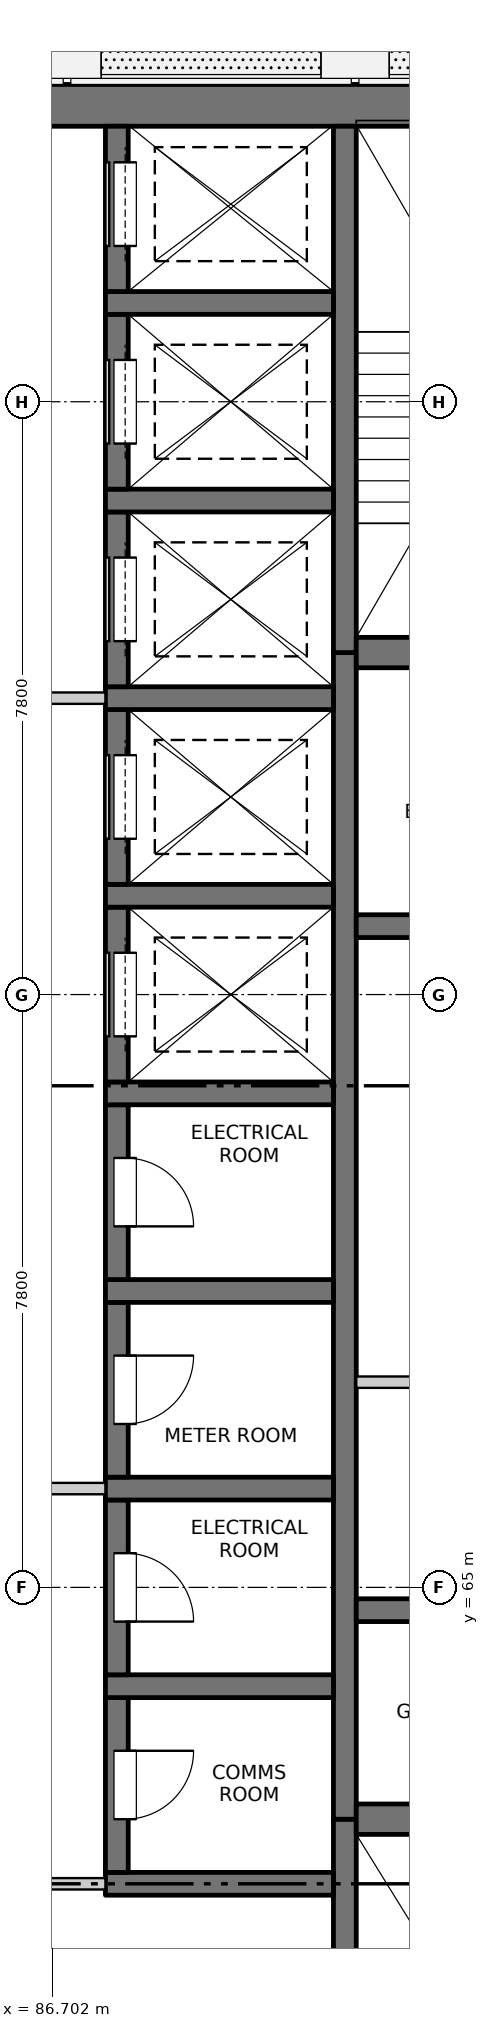
"""IFC4 building model, lengths in metres.
Left out: names, types, materials, properties, quantities, classifications, styles, units other than length and angle.
Written with IfcOpenShell. Run it as: python <this file> out.ifc"""

import sys

from ifc_helpers import new_model, si_unit, direction, frame, frame_2d, origin, place, context, subcontext, project, spatial, rectangle, extrude, element, fill, save


model = new_model("IFC4")
c1 = context("Model", 3, precision=1e-05, world=origin(), true_north=direction((0.0, 1.0)))
c2 = subcontext(c1, "Body", "Model", "MODEL_VIEW")
j1 = project(units=[si_unit("LENGTHUNIT", "METRE"), si_unit("PLANEANGLEUNIT", "RADIAN")], contexts=[c1])
p1 = place(None, origin())
s1 = spatial("IfcSite", under=j1, at=p1, CompositionType="ELEMENT")
p2 = place(p1, origin())
s2 = spatial("IfcBuilding", under=s1, at=p2, CompositionType="ELEMENT")
p3 = place(p2, frame((0.0, 0.0, 148.6)))
s3 = spatial("IfcBuildingStorey", under=s2, at=p3, CompositionType="ELEMENT", Elevation=148.6)
p4 = place(p3, frame((75.525, 84.5, -0.3), z_axis=(0.0, 0.0, 1.0), x_axis=(1.0, 0.0, 0.0)))
e1 = element("IfcWall", 1, at=p4, inside=s3, PredefinedType="SOLIDWALL", context=c2, shape_type="SweptSolid", body=[
    extrude(rectangle(XDim=18.95, YDim=0.55, at=frame_2d((9.475, 0.0))), origin(), (0.0, 0.0, 1.0), 3.45),
])
p5 = place(p3, frame((90.55, 55.525, -0.3), z_axis=(0.0, 0.0, 1.0), x_axis=(0.0, 1.0, 0.0)))
e2 = element("IfcWall", 2, at=p5, inside=s3, PredefinedType="SOLIDWALL", context=c2, shape_type="SweptSolid", body=[
    extrude(rectangle(XDim=6.425, YDim=0.3, at=frame_2d((3.212, 0.0))), origin(), (0.0, 0.0, 1.0), 3.45),
])
p6 = place(p5, frame((0.125, 0.0, 0.3)))
e3 = element("IfcOpeningElement", 3, at=p6, cuts=e2, PredefinedType="OPENING", context=c2, shape_type="SweptSolid", body=[
    extrude(rectangle(XDim=1.2, YDim=2.1, at=frame_2d((0.6, 1.05))), frame((0.0, 0.16, 0.0), z_axis=(0.0, -1.0, 0.0), x_axis=(1.0, 0.0, 0.0)), (0.0, 0.0, 1.0), 0.32),
])
p7 = place(p3, frame((90.55, 61.95, -0.3), z_axis=(0.0, 0.0, 1.0), x_axis=(0.0, 1.0, 0.0)))
e4 = element("IfcWall", 4, at=p7, inside=s3, PredefinedType="SOLIDWALL", context=c2, shape_type="SweptSolid", body=[
    extrude(rectangle(XDim=15.35, YDim=0.3, at=frame_2d((7.675, 0.0))), origin(), (0.0, 0.0, 1.0), 3.45),
])
p8 = place(p3, frame((90.55, 77.3, -0.3), z_axis=(0.0, 0.0, 1.0), x_axis=(0.0, 1.0, 0.0)))
e5 = element("IfcWall", 5, at=p8, inside=s3, PredefinedType="SOLIDWALL", context=c2, shape_type="SweptSolid", body=[
    extrude(rectangle(XDim=6.925, YDim=0.3, at=frame_2d((3.462, 0.0))), origin(), (0.0, 0.0, 1.0), 3.45),
])
p9 = place(p3, frame((87.4, 61.1, -0.3), z_axis=(0.0, 0.0, 1.0), x_axis=(1.0, 0.0, 0.0)))
e6 = element("IfcWall", 6, at=p9, inside=s3, PredefinedType="SOLIDWALL", context=c2, shape_type="SweptSolid", body=[
    extrude(rectangle(XDim=3.0, YDim=0.3, at=frame_2d((1.5, 0.0))), origin(), (0.0, 0.0, 1.0), 3.45),
])
p10 = place(p3, frame((87.55, 61.25, -0.3), z_axis=(0.0, 0.0, 1.0), x_axis=(0.0, 1.0, 0.0)))
e7 = element("IfcWall", 7, at=p10, inside=s3, PredefinedType="SOLIDWALL", context=c2, shape_type="SweptSolid", body=[
    extrude(rectangle(XDim=2.3, YDim=0.3, at=frame_2d((1.15, 0.0))), origin(), (0.0, 0.0, 1.0), 3.45),
])
p11 = place(p10, frame((0.7, 0.0, 0.3)))
e8 = element("IfcOpeningElement", 8, at=p11, cuts=e7, PredefinedType="OPENING", context=c2, shape_type="SweptSolid", body=[
    extrude(rectangle(XDim=0.9, YDim=2.1, at=frame_2d((0.45, 1.05))), frame((0.0, 0.16, 0.0), z_axis=(0.0, -1.0, 0.0), x_axis=(1.0, 0.0, 0.0)), (0.0, 0.0, 1.0), 0.32),
])
p12 = place(p3, frame((87.4, 63.7, -0.3), z_axis=(0.0, 0.0, 1.0), x_axis=(1.0, 0.0, 0.0)))
e9 = element("IfcWall", 9, at=p12, inside=s3, PredefinedType="SOLIDWALL", context=c2, shape_type="SweptSolid", body=[
    extrude(rectangle(XDim=3.0, YDim=0.3, at=frame_2d((1.5, 0.0))), origin(), (0.0, 0.0, 1.0), 3.45),
])
p13 = place(p3, frame((87.55, 63.85, -0.3), z_axis=(0.0, 0.0, 1.0), x_axis=(0.0, 1.0, 0.0)))
e10 = element("IfcWall", 10, at=p13, inside=s3, PredefinedType="SOLIDWALL", context=c2, shape_type="SweptSolid", body=[
    extrude(rectangle(XDim=2.3, YDim=0.3, at=frame_2d((1.15, 0.0))), origin(), (0.0, 0.0, 1.0), 3.45),
])
p14 = place(p13, frame((0.7, 0.0, 0.3)))
e11 = element("IfcOpeningElement", 11, at=p14, cuts=e10, PredefinedType="OPENING", context=c2, shape_type="SweptSolid", body=[
    extrude(rectangle(XDim=0.9, YDim=2.1, at=frame_2d((0.45, 1.05))), frame((0.0, 0.16, 0.0), z_axis=(0.0, -1.0, 0.0), x_axis=(1.0, 0.0, 0.0)), (0.0, 0.0, 1.0), 0.32),
])
p15 = place(p3, frame((87.4, 66.3, -0.3), z_axis=(0.0, 0.0, 1.0), x_axis=(1.0, 0.0, 0.0)))
e12 = element("IfcWall", 12, at=p15, inside=s3, PredefinedType="SOLIDWALL", context=c2, shape_type="SweptSolid", body=[
    extrude(rectangle(XDim=3.0, YDim=0.3, at=frame_2d((1.5, 0.0))), origin(), (0.0, 0.0, 1.0), 3.45),
])
p16 = place(p3, frame((87.55, 66.45, -0.3), z_axis=(0.0, 0.0, 1.0), x_axis=(0.0, 1.0, 0.0)))
e13 = element("IfcWall", 13, at=p16, inside=s3, PredefinedType="SOLIDWALL", context=c2, shape_type="SweptSolid", body=[
    extrude(rectangle(XDim=2.3, YDim=0.3, at=frame_2d((1.15, 0.0))), origin(), (0.0, 0.0, 1.0), 3.45),
])
p17 = place(p16, frame((0.7, 0.0, 0.3)))
e14 = element("IfcOpeningElement", 14, at=p17, cuts=e13, PredefinedType="OPENING", context=c2, shape_type="SweptSolid", body=[
    extrude(rectangle(XDim=0.9, YDim=2.1, at=frame_2d((0.45, 1.05))), frame((0.0, 0.16, 0.0), z_axis=(0.0, -1.0, 0.0), x_axis=(1.0, 0.0, 0.0)), (0.0, 0.0, 1.0), 0.32),
])
p18 = place(p3, frame((87.4, 68.9, -0.3), z_axis=(0.0, 0.0, 1.0), x_axis=(1.0, 0.0, 0.0)))
e15 = element("IfcWall", 15, at=p18, inside=s3, PredefinedType="SOLIDWALL", context=c2, shape_type="SweptSolid", body=[
    extrude(rectangle(XDim=3.0, YDim=0.3, at=frame_2d((1.5, 0.0))), origin(), (0.0, 0.0, 1.0), 3.45),
])
p19 = place(p3, frame((87.55, 69.05, -0.3), z_axis=(0.0, 0.0, 1.0), x_axis=(0.0, 1.0, 0.0)))
e16 = element("IfcWall", 16, at=p19, inside=s3, PredefinedType="SOLIDWALL", context=c2, shape_type="SweptSolid", body=[
    extrude(rectangle(XDim=2.3, YDim=0.3, at=frame_2d((1.15, 0.0))), origin(), (0.0, 0.0, 1.0), 3.45),
])
p20 = place(p19, frame((0.7, 0.0, 0.3)))
e17 = element("IfcOpeningElement", 17, at=p20, cuts=e16, PredefinedType="OPENING", context=c2, shape_type="SweptSolid", body=[
    extrude(rectangle(XDim=0.9, YDim=2.1, at=frame_2d((0.45, 1.05))), frame((0.0, 0.16, 0.0), z_axis=(0.0, -1.0, 0.0), x_axis=(1.0, 0.0, 0.0)), (0.0, 0.0, 1.0), 0.32),
])
p21 = place(p3, frame((87.4, 71.5, -0.3), z_axis=(0.0, 0.0, 1.0), x_axis=(1.0, 0.0, 0.0)))
e18 = element("IfcWall", 18, at=p21, inside=s3, PredefinedType="SOLIDWALL", context=c2, shape_type="SweptSolid", body=[
    extrude(rectangle(XDim=3.0, YDim=0.3, at=frame_2d((1.5, 0.0))), origin(), (0.0, 0.0, 1.0), 3.45),
])
p22 = place(p3, frame((87.55, 71.65, -0.3), z_axis=(0.0, 0.0, 1.0), x_axis=(0.0, 1.0, 0.0)))
e19 = element("IfcWall", 19, at=p22, inside=s3, PredefinedType="SOLIDWALL", context=c2, shape_type="SweptSolid", body=[
    extrude(rectangle(XDim=2.3, YDim=0.3, at=frame_2d((1.15, 0.0))), origin(), (0.0, 0.0, 1.0), 3.45),
])
p23 = place(p22, frame((0.6, 0.0, 0.3)))
e20 = element("IfcOpeningElement", 20, at=p23, cuts=e19, PredefinedType="OPENING", context=c2, shape_type="SweptSolid", body=[
    extrude(rectangle(XDim=1.1, YDim=2.1, at=frame_2d((0.55, 1.05))), frame((0.0, 0.16, 0.0), z_axis=(0.0, -1.0, 0.0), x_axis=(1.0, 0.0, 0.0)), (0.0, 0.0, 1.0), 0.32),
])
p24 = place(p3, frame((87.4, 74.1, -0.3), z_axis=(0.0, 0.0, 1.0), x_axis=(1.0, 0.0, 0.0)))
e21 = element("IfcWall", 21, at=p24, inside=s3, PredefinedType="SOLIDWALL", context=c2, shape_type="SweptSolid", body=[
    extrude(rectangle(XDim=3.0, YDim=0.3, at=frame_2d((1.5, 0.0))), origin(), (0.0, 0.0, 1.0), 3.45),
])
p25 = place(p3, frame((87.55, 74.25, -0.3), z_axis=(0.0, 0.0, 1.0), x_axis=(0.0, 1.0, 0.0)))
e22 = element("IfcWall", 22, at=p25, inside=s3, PredefinedType="SOLIDWALL", context=c2, shape_type="SweptSolid", body=[
    extrude(rectangle(XDim=2.3, YDim=0.3, at=frame_2d((1.15, 0.0))), origin(), (0.0, 0.0, 1.0), 3.45),
])
p26 = place(p25, frame((0.6, 0.0, 0.3)))
e23 = element("IfcOpeningElement", 23, at=p26, cuts=e22, PredefinedType="OPENING", context=c2, shape_type="SweptSolid", body=[
    extrude(rectangle(XDim=1.1, YDim=2.1, at=frame_2d((0.55, 1.05))), frame((0.0, 0.16, 0.0), z_axis=(0.0, -1.0, 0.0), x_axis=(1.0, 0.0, 0.0)), (0.0, 0.0, 1.0), 0.32),
])
p27 = place(p3, frame((87.4, 76.7, -0.3), z_axis=(0.0, 0.0, 1.0), x_axis=(1.0, 0.0, 0.0)))
e24 = element("IfcWall", 24, at=p27, inside=s3, PredefinedType="SOLIDWALL", context=c2, shape_type="SweptSolid", body=[
    extrude(rectangle(XDim=3.0, YDim=0.3, at=frame_2d((1.5, 0.0))), origin(), (0.0, 0.0, 1.0), 3.45),
])
p28 = place(p3, frame((87.55, 76.85, -0.3), z_axis=(0.0, 0.0, 1.0), x_axis=(0.0, 1.0, 0.0)))
e25 = element("IfcWall", 25, at=p28, inside=s3, PredefinedType="SOLIDWALL", context=c2, shape_type="SweptSolid", body=[
    extrude(rectangle(XDim=2.3, YDim=0.3, at=frame_2d((1.15, 0.0))), origin(), (0.0, 0.0, 1.0), 3.45),
])
p29 = place(p28, frame((0.6, 0.0, 0.3)))
e26 = element("IfcOpeningElement", 26, at=p29, cuts=e25, PredefinedType="OPENING", context=c2, shape_type="SweptSolid", body=[
    extrude(rectangle(XDim=1.1, YDim=2.1, at=frame_2d((0.55, 1.05))), frame((0.0, 0.16, 0.0), z_axis=(0.0, -1.0, 0.0), x_axis=(1.0, 0.0, 0.0)), (0.0, 0.0, 1.0), 0.32),
])
p30 = place(p3, frame((87.4, 79.3, -0.3), z_axis=(0.0, 0.0, 1.0), x_axis=(1.0, 0.0, 0.0)))
e27 = element("IfcWall", 27, at=p30, inside=s3, PredefinedType="SOLIDWALL", context=c2, shape_type="SweptSolid", body=[
    extrude(rectangle(XDim=3.0, YDim=0.3, at=frame_2d((1.5, 0.0))), origin(), (0.0, 0.0, 1.0), 3.45),
])
p31 = place(p3, frame((87.55, 79.45, -0.3), z_axis=(0.0, 0.0, 1.0), x_axis=(0.0, 1.0, 0.0)))
e28 = element("IfcWall", 28, at=p31, inside=s3, PredefinedType="SOLIDWALL", context=c2, shape_type="SweptSolid", body=[
    extrude(rectangle(XDim=2.3, YDim=0.3, at=frame_2d((1.15, 0.0))), origin(), (0.0, 0.0, 1.0), 3.45),
])
p32 = place(p31, frame((0.6, 0.0, 0.3)))
e29 = element("IfcOpeningElement", 29, at=p32, cuts=e28, PredefinedType="OPENING", context=c2, shape_type="SweptSolid", body=[
    extrude(rectangle(XDim=1.1, YDim=2.1, at=frame_2d((0.55, 1.05))), frame((0.0, 0.16, 0.0), z_axis=(0.0, -1.0, 0.0), x_axis=(1.0, 0.0, 0.0)), (0.0, 0.0, 1.0), 0.32),
])
p33 = place(p3, frame((87.4, 81.9, -0.3), z_axis=(0.0, 0.0, 1.0), x_axis=(1.0, 0.0, 0.0)))
e30 = element("IfcWall", 30, at=p33, inside=s3, PredefinedType="SOLIDWALL", context=c2, shape_type="SweptSolid", body=[
    extrude(rectangle(XDim=3.0, YDim=0.3, at=frame_2d((1.5, 0.0))), origin(), (0.0, 0.0, 1.0), 3.45),
])
p34 = place(p3, frame((87.55, 82.05, -0.3), z_axis=(0.0, 0.0, 1.0), x_axis=(0.0, 1.0, 0.0)))
e31 = element("IfcWall", 31, at=p34, inside=s3, PredefinedType="SOLIDWALL", context=c2, shape_type="SweptSolid", body=[
    extrude(rectangle(XDim=2.175, YDim=0.3, at=frame_2d((1.087, 0.0))), origin(), (0.0, 0.0, 1.0), 3.45),
])
p35 = place(p34, frame((0.6, 0.0, 0.3)))
e32 = element("IfcOpeningElement", 32, at=p35, cuts=e31, PredefinedType="OPENING", context=c2, shape_type="SweptSolid", body=[
    extrude(rectangle(XDim=1.1, YDim=2.1, at=frame_2d((0.55, 1.05))), frame((0.0, 0.16, 0.0), z_axis=(0.0, -1.0, 0.0), x_axis=(1.0, 0.0, 0.0)), (0.0, 0.0, 1.0), 0.32),
])
p36 = place(p3, frame((90.7, 61.95, -0.3), z_axis=(0.0, 0.0, 1.0), x_axis=(1.0, 0.0, 0.0)))
e33 = element("IfcWall", 33, at=p36, inside=s3, PredefinedType="SOLIDWALL", context=c2, shape_type="SweptSolid", body=[
    extrude(rectangle(XDim=3.775, YDim=0.4, at=frame_2d((1.888, 0.0))), origin(), (0.0, 0.0, 1.0), 3.45),
])
for number, where, z_axis, x_axis in (
    (34, (90.7, 64.7, -0.3), (0.0, 0.0, 1.0), (1.0, 0.0, 0.0)),
    (35, (90.7, 73.7, -0.3), (0.0, 0.0, 1.0), (1.0, 0.0, 0.0)),
):
    element("IfcWall", number, at=place(p3, frame(where, z_axis=z_axis, x_axis=x_axis)), inside=s3, PredefinedType="SOLIDWALL", context=c2, shape_type="SweptSolid", body=[
        extrude(rectangle(XDim=3.775, YDim=0.3, at=frame_2d((1.888, 0.0))), origin(), (0.0, 0.0, 1.0), 3.45),
    ])
p37 = place(p3, frame((90.7, 77.3, -0.3), z_axis=(0.0, 0.0, 1.0), x_axis=(1.0, 0.0, 0.0)))
e36 = element("IfcWall", 36, at=p37, inside=s3, PredefinedType="SOLIDWALL", context=c2, shape_type="SweptSolid", body=[
    extrude(rectangle(XDim=3.775, YDim=0.4, at=frame_2d((1.888, 0.0))), origin(), (0.0, 0.0, 1.0), 3.45),
])
p38 = place(p3, frame((82.6, 61.1, 0.0), z_axis=(0.0, 0.0, 1.0), x_axis=(1.0, 0.0, 0.0)))
e37 = element("IfcWall", 37, at=p38, inside=s3, PredefinedType="PARTITIONING", context=c2, shape_type="SweptSolid", body=[
    extrude(rectangle(XDim=4.8, YDim=0.15, at=frame_2d((2.4, 0.0))), origin(), (0.0, 0.0, 1.0), 3.15),
])
p39 = place(p38, frame((1.5, 0.0, 0.0)))
e38 = element("IfcOpeningElement", 38, at=p39, cuts=e37, PredefinedType="OPENING", context=c2, shape_type="SweptSolid", body=[
    extrude(rectangle(XDim=1.8, YDim=2.1, at=frame_2d((0.9, 1.05))), frame((0.0, 0.085, 0.0), z_axis=(0.0, -1.0, 0.0), x_axis=(1.0, 0.0, 0.0)), (0.0, 0.0, 1.0), 0.17),
])
p40 = place(p3, frame((82.6, 66.3, 0.0), z_axis=(0.0, 0.0, 1.0), x_axis=(1.0, 0.0, 0.0)))
e39 = element("IfcWall", 39, at=p40, inside=s3, PredefinedType="PARTITIONING", context=c2, shape_type="SweptSolid", body=[
    extrude(rectangle(XDim=4.8, YDim=0.15, at=frame_2d((2.4, 0.0))), origin(), (0.0, 0.0, 1.0), 3.15),
])
p41 = place(p40, frame((1.5, 0.0, 0.0)))
e40 = element("IfcOpeningElement", 40, at=p41, cuts=e39, PredefinedType="OPENING", context=c2, shape_type="SweptSolid", body=[
    extrude(rectangle(XDim=1.8, YDim=2.1, at=frame_2d((0.9, 1.05))), frame((0.0, 0.085, 0.0), z_axis=(0.0, -1.0, 0.0), x_axis=(1.0, 0.0, 0.0)), (0.0, 0.0, 1.0), 0.17),
])
p42 = place(p3, frame((90.7, 67.7, 0.0), z_axis=(0.0, 0.0, 1.0), x_axis=(1.0, 0.0, 0.0)))
e41 = element("IfcWall", 41, at=p42, inside=s3, PredefinedType="PARTITIONING", context=c2, shape_type="SweptSolid", body=[
    extrude(rectangle(XDim=3.775, YDim=0.15, at=frame_2d((1.887, 0.0))), origin(), (0.0, 0.0, 1.0), 3.15),
])
p43 = place(p3, frame((82.6, 76.7, 0.0), z_axis=(0.0, 0.0, 1.0), x_axis=(1.0, 0.0, 0.0)))
e42 = element("IfcWall", 42, at=p43, inside=s3, PredefinedType="PARTITIONING", context=c2, shape_type="SweptSolid", body=[
    extrude(rectangle(XDim=4.8, YDim=0.15, at=frame_2d((2.4, 0.0))), origin(), (0.0, 0.0, 1.0), 3.15),
])
p44 = place(p43, frame((1.5, 0.0, 0.0)))
e43 = element("IfcOpeningElement", 43, at=p44, cuts=e42, PredefinedType="OPENING", context=c2, shape_type="SweptSolid", body=[
    extrude(rectangle(XDim=1.8, YDim=2.1, at=frame_2d((0.9, 1.05))), frame((0.0, 0.085, 0.0), z_axis=(0.0, -1.0, 0.0), x_axis=(1.0, 0.0, 0.0)), (0.0, 0.0, 1.0), 0.17),
])
p45 = place(p11, origin())
e44 = element("IfcDoor", 44, at=p45, inside=s3, OperationType="SINGLE_SWING_LEFT", PredefinedType="DOOR", context=c2, shape_type="SweptSolid", body=[
    extrude(rectangle(XDim=0.9, YDim=2.1, at=frame_2d((0.45, 1.05))), frame((0.0, -0.085, 0.0), z_axis=(0.0, -1.0, 0.0), x_axis=(1.0, 0.0, 0.0)), (0.0, 0.0, 1.0), 0.05),
])
fill(e8, e44)
p46 = place(p14, origin())
e45 = element("IfcDoor", 45, at=p46, inside=s3, OperationType="SINGLE_SWING_RIGHT", PredefinedType="DOOR", context=c2, shape_type="SweptSolid", body=[
    extrude(rectangle(XDim=0.9, YDim=2.1, at=frame_2d((0.45, 1.05))), frame((0.0, -0.085, 0.0), z_axis=(0.0, -1.0, 0.0), x_axis=(1.0, 0.0, 0.0)), (0.0, 0.0, 1.0), 0.05),
])
fill(e11, e45)
p47 = place(p17, origin())
e46 = element("IfcDoor", 46, at=p47, inside=s3, OperationType="SINGLE_SWING_LEFT", PredefinedType="DOOR", context=c2, shape_type="SweptSolid", body=[
    extrude(rectangle(XDim=0.9, YDim=2.1, at=frame_2d((0.45, 1.05))), frame((0.0, -0.085, 0.0), z_axis=(0.0, -1.0, 0.0), x_axis=(1.0, 0.0, 0.0)), (0.0, 0.0, 1.0), 0.05),
])
fill(e14, e46)
p48 = place(p20, origin())
e47 = element("IfcDoor", 47, at=p48, inside=s3, OperationType="SINGLE_SWING_RIGHT", PredefinedType="DOOR", context=c2, shape_type="SweptSolid", body=[
    extrude(rectangle(XDim=0.9, YDim=2.1, at=frame_2d((0.45, 1.05))), frame((0.0, -0.085, 0.0), z_axis=(0.0, -1.0, 0.0), x_axis=(1.0, 0.0, 0.0)), (0.0, 0.0, 1.0), 0.05),
])
fill(e17, e47)
p49 = place(p23, origin())
e48 = element("IfcDoor", 48, at=p49, inside=s3, OperationType="SLIDING_TO_LEFT", PredefinedType="DOOR", context=c2, shape_type="SweptSolid", body=[
    extrude(rectangle(XDim=1.1, YDim=2.1, at=frame_2d((0.55, 1.05))), frame((0.0, -0.085, 0.0), z_axis=(0.0, -1.0, 0.0), x_axis=(1.0, 0.0, 0.0)), (0.0, 0.0, 1.0), 0.05),
])
fill(e20, e48)
p50 = place(p26, origin())
e49 = element("IfcDoor", 49, at=p50, inside=s3, OperationType="SLIDING_TO_LEFT", PredefinedType="DOOR", context=c2, shape_type="SweptSolid", body=[
    extrude(rectangle(XDim=1.1, YDim=2.1, at=frame_2d((0.55, 1.05))), frame((0.0, -0.085, 0.0), z_axis=(0.0, -1.0, 0.0), x_axis=(1.0, 0.0, 0.0)), (0.0, 0.0, 1.0), 0.05),
])
fill(e23, e49)
p51 = place(p29, origin())
e50 = element("IfcDoor", 50, at=p51, inside=s3, OperationType="SLIDING_TO_LEFT", PredefinedType="DOOR", context=c2, shape_type="SweptSolid", body=[
    extrude(rectangle(XDim=1.1, YDim=2.1, at=frame_2d((0.55, 1.05))), frame((0.0, -0.085, 0.0), z_axis=(0.0, -1.0, 0.0), x_axis=(1.0, 0.0, 0.0)), (0.0, 0.0, 1.0), 0.05),
])
fill(e26, e50)
p52 = place(p32, origin())
e51 = element("IfcDoor", 51, at=p52, inside=s3, OperationType="SLIDING_TO_RIGHT", PredefinedType="DOOR", context=c2, shape_type="SweptSolid", body=[
    extrude(rectangle(XDim=1.1, YDim=2.1, at=frame_2d((0.55, 1.05))), frame((0.0, -0.085, 0.0), z_axis=(0.0, -1.0, 0.0), x_axis=(1.0, 0.0, 0.0)), (0.0, 0.0, 1.0), 0.05),
])
fill(e29, e51)
p53 = place(p35, origin())
e52 = element("IfcDoor", 52, at=p53, inside=s3, OperationType="SLIDING_TO_RIGHT", PredefinedType="DOOR", context=c2, shape_type="SweptSolid", body=[
    extrude(rectangle(XDim=1.1, YDim=2.1, at=frame_2d((0.55, 1.05))), frame((0.0, -0.085, 0.0), z_axis=(0.0, -1.0, 0.0), x_axis=(1.0, 0.0, 0.0)), (0.0, 0.0, 1.0), 0.05),
])
fill(e32, e52)
save(model, sys.argv[1])
